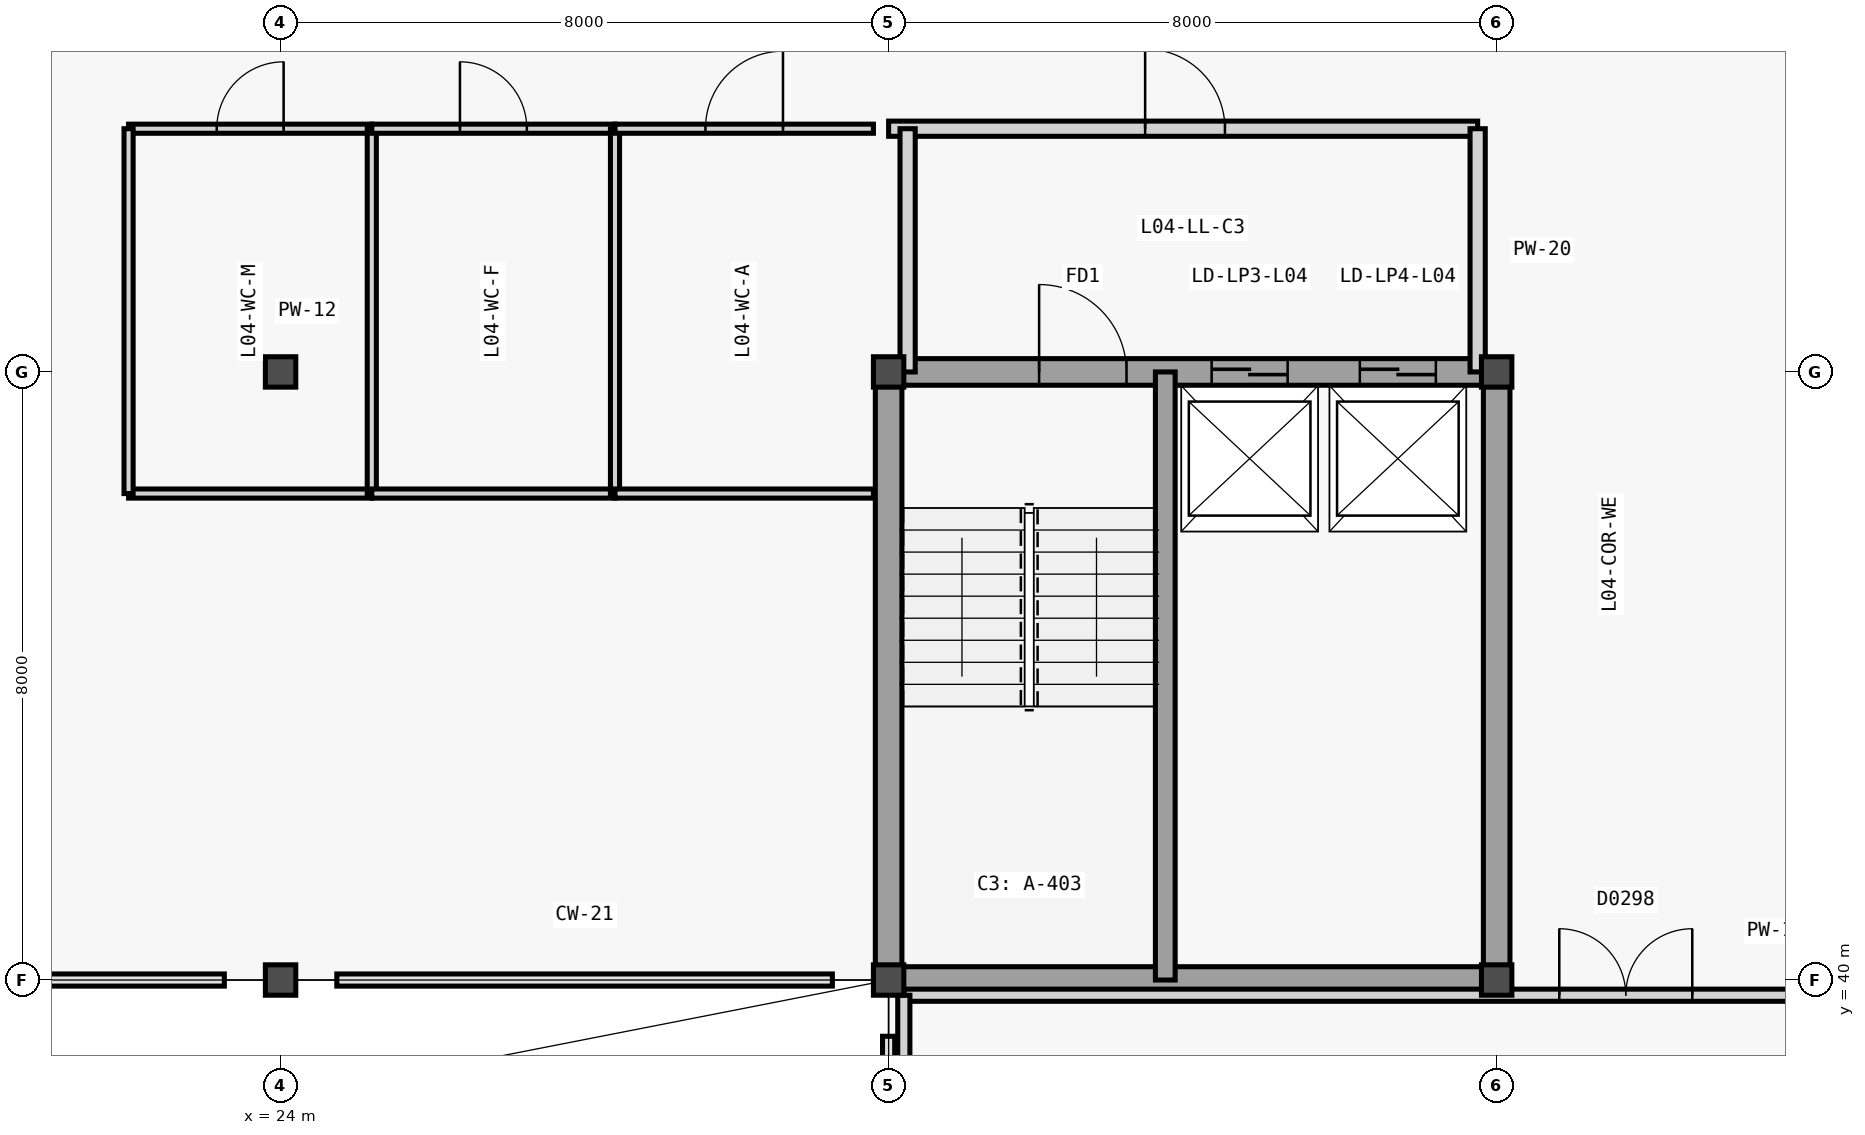
"""IFC4 building model, lengths in metres.
Left out: names, types, materials, properties, quantities, classifications, styles, units other than length and angle.
Written with IfcOpenShell. Run it as: python <this file> out.ifc"""

import sys

from ifc_helpers import new_model, si_unit, direction, frame, frame_2d, origin, origin_2d, place, context, subcontext, project, spatial, rectangle, extrude, element, fill, save


model = new_model("IFC4")
c1 = context("Model", 3, precision=1e-05, world=origin(), true_north=direction((0.0, 1.0)))
c2 = subcontext(c1, "Body", "Model", "MODEL_VIEW")
j1 = project(units=[si_unit("LENGTHUNIT", "METRE"), si_unit("PLANEANGLEUNIT", "RADIAN")], contexts=[c1])
p1 = place(None, origin())
s1 = spatial("IfcSite", under=j1, at=p1, CompositionType="ELEMENT")
p2 = place(p1, origin())
s2 = spatial("IfcBuilding", under=s1, at=p2, CompositionType="ELEMENT")
p3 = place(p2, frame((0.0, 0.0, 18.0)))
s3 = spatial("IfcBuildingStorey", under=s2, at=p3, CompositionType="ELEMENT", Elevation=18.0)
for number, where, z_axis, x_axis in (
    (1, (24.0, 40.0, 0.0), (0.0, 0.0, 1.0), (1.0, 0.0, 0.0)),
    (2, (24.0, 48.0, 0.0), (0.0, 0.0, 1.0), (1.0, 0.0, 0.0)),
    (3, (32.0, 40.0, 0.0), (0.0, 0.0, 1.0), (1.0, 0.0, 0.0)),
    (4, (32.0, 48.0, 0.0), (0.0, 0.0, 1.0), (1.0, 0.0, 0.0)),
    (5, (40.0, 40.0, 0.0), (0.0, 0.0, 1.0), (1.0, 0.0, 0.0)),
    (6, (40.0, 48.0, 0.0), (0.0, 0.0, 1.0), (1.0, 0.0, 0.0)),
):
    element("IfcColumn", number, at=place(p3, frame(where, z_axis=z_axis, x_axis=x_axis)), inside=s3, PredefinedType="COLUMN", context=c2, shape_type="SweptSolid", body=[
        extrude(rectangle(XDim=0.4, YDim=0.4, at=origin_2d()), origin(), (0.0, 0.0, 1.0), 3.6),
    ])
for number, where, z_axis, x_axis in (
    (7, (32.0, 40.0, 0.0), (0.0, 0.0, 1.0), (1.0, 0.0, 0.0)),
    (8, (32.0, 40.0, 0.0), (0.0, 0.0, 1.0), (0.0, 1.0, 0.0)),
    (9, (40.0, 40.0, 0.0), (0.0, 0.0, 1.0), (0.0, 1.0, 0.0)),
):
    element("IfcWall", number, at=place(p3, frame(where, z_axis=z_axis, x_axis=x_axis)), inside=s3, PredefinedType="SHEAR", context=c2, shape_type="SweptSolid", body=[
        extrude(rectangle(XDim=8.0, YDim=0.35, at=frame_2d((4.0, 0.0))), origin(), (0.0, 0.0, 1.0), 3.6),
    ])
p4 = place(p3, frame((32.0, 48.0, 0.0), z_axis=(0.0, 0.0, 1.0), x_axis=(1.0, 0.0, 0.0)))
e10 = element("IfcWall", 10, at=p4, inside=s3, PredefinedType="SHEAR", context=c2, shape_type="SweptSolid", body=[
    extrude(rectangle(XDim=8.0, YDim=0.35, at=frame_2d((4.0, 0.0))), origin(), (0.0, 0.0, 1.0), 3.6),
])
p5 = place(p4, frame((1.98, 0.0, 0.0)))
e11 = element("IfcOpeningElement", 11, at=p5, cuts=e10, PredefinedType="OPENING", context=c2, shape_type="SweptSolid", body=[
    extrude(rectangle(XDim=1.15, YDim=2.2, at=frame_2d((0.575, 1.1))), frame((0.0, 0.185, 0.0), z_axis=(0.0, -1.0, 0.0), x_axis=(1.0, 0.0, 0.0)), (0.0, 0.0, 1.0), 0.37),
])
p6 = place(p4, frame((4.25, 0.0, 0.0)))
e12 = element("IfcOpeningElement", 12, at=p6, cuts=e10, PredefinedType="OPENING", context=c2, shape_type="SweptSolid", body=[
    extrude(rectangle(XDim=1.0, YDim=2.15, at=frame_2d((0.5, 1.075))), frame((0.0, 0.185, 0.0), z_axis=(0.0, -1.0, 0.0), x_axis=(1.0, 0.0, 0.0)), (0.0, 0.0, 1.0), 0.37),
])
p7 = place(p4, frame((6.2, 0.0, 0.0)))
e13 = element("IfcOpeningElement", 13, at=p7, cuts=e10, PredefinedType="OPENING", context=c2, shape_type="SweptSolid", body=[
    extrude(rectangle(XDim=1.0, YDim=2.15, at=frame_2d((0.5, 1.075))), frame((0.0, 0.185, 0.0), z_axis=(0.0, -1.0, 0.0), x_axis=(1.0, 0.0, 0.0)), (0.0, 0.0, 1.0), 0.37),
])
p8 = place(p3, frame((35.64, 40.0, 0.0), z_axis=(0.0, 0.0, 1.0), x_axis=(0.0, 1.0, 0.0)))
e14 = element("IfcWall", 14, at=p8, inside=s3, PredefinedType="SHEAR", context=c2, shape_type="SweptSolid", body=[
    extrude(rectangle(XDim=8.0, YDim=0.26, at=frame_2d((4.0, 0.0))), origin(), (0.0, 0.0, 1.0), 3.6),
])
p9 = place(p3, frame((32.0, 51.2, 0.0), z_axis=(0.0, 0.0, 1.0), x_axis=(1.0, 0.0, 0.0)))
e15 = element("IfcWall", 15, at=p9, inside=s3, PredefinedType="PARTITIONING", context=c2, shape_type="SweptSolid", body=[
    extrude(rectangle(XDim=7.75, YDim=0.2, at=frame_2d((3.875, 0.0))), origin(), (0.0, 0.0, 1.0), 3.32),
])
p10 = place(p9, frame((3.375, 0.0, 0.0)))
e16 = element("IfcOpeningElement", 16, at=p10, cuts=e15, PredefinedType="OPENING", context=c2, shape_type="SweptSolid", body=[
    extrude(rectangle(XDim=1.05, YDim=2.15, at=frame_2d((0.525, 1.075))), frame((0.0, 0.11, 0.0), z_axis=(0.0, -1.0, 0.0), x_axis=(1.0, 0.0, 0.0)), (0.0, 0.0, 1.0), 0.22),
])
for number, where, z_axis, x_axis in (
    (17, (39.75, 48.0, 0.0), (0.0, 0.0, 1.0), (0.0, 1.0, 0.0)),
    (18, (32.25, 48.0, 0.0), (0.0, 0.0, 1.0), (0.0, 1.0, 0.0)),
):
    element("IfcWall", number, at=place(p3, frame(where, z_axis=z_axis, x_axis=x_axis)), inside=s3, PredefinedType="PARTITIONING", context=c2, shape_type="SweptSolid", body=[
        extrude(rectangle(XDim=3.2, YDim=0.2, at=frame_2d((1.6, 0.0))), origin(), (0.0, 0.0, 1.0), 2.78),
    ])
p11 = place(p3, frame((32.2, 39.8, 0.0), z_axis=(0.0, 0.0, 1.0), x_axis=(1.0, 0.0, 0.0)))
e19 = element("IfcWall", 19, at=p11, inside=s3, PredefinedType="PARTITIONING", context=c2, shape_type="SweptSolid", body=[
    extrude(rectangle(XDim=15.3, YDim=0.16, at=frame_2d((7.65, 0.0))), origin(), (0.0, 0.0, 1.0), 2.7),
])
p12 = place(p11, frame((8.624, 0.0, 0.0)))
e20 = element("IfcOpeningElement", 20, at=p12, cuts=e19, PredefinedType="OPENING", context=c2, shape_type="SweptSolid", body=[
    extrude(rectangle(XDim=1.75, YDim=2.2, at=frame_2d((0.875, 1.1))), frame((0.0, 0.09, 0.0), z_axis=(0.0, -1.0, 0.0), x_axis=(1.0, 0.0, 0.0)), (0.0, 0.0, 1.0), 0.18),
])
p13 = place(p3, frame((32.2, 16.5, 0.0), z_axis=(0.0, 0.0, 1.0), x_axis=(0.0, 1.0, 0.0)))
e21 = element("IfcWall", 21, at=p13, inside=s3, PredefinedType="PARTITIONING", context=c2, shape_type="SweptSolid", body=[
    extrude(rectangle(XDim=23.3, YDim=0.16, at=frame_2d((11.65, 0.0))), origin(), (0.0, 0.0, 1.0), 2.78),
])
p14 = place(p3, frame((22.0, 46.4, 0.0), z_axis=(0.0, 0.0, 1.0), x_axis=(1.0, 0.0, 0.0)))
e22 = element("IfcWall", 22, at=p14, inside=s3, PredefinedType="PARTITIONING", context=c2, shape_type="SweptSolid", body=[
    extrude(rectangle(XDim=3.2, YDim=0.12, at=frame_2d((1.6, 0.0))), origin(), (0.0, 0.0, 1.0), 3.34),
])
p15 = place(p3, frame((22.0, 51.2, 0.0), z_axis=(0.0, 0.0, 1.0), x_axis=(1.0, 0.0, 0.0)))
e23 = element("IfcWall", 23, at=p15, inside=s3, PredefinedType="PARTITIONING", context=c2, shape_type="SweptSolid", body=[
    extrude(rectangle(XDim=3.2, YDim=0.12, at=frame_2d((1.6, 0.0))), origin(), (0.0, 0.0, 1.0), 3.34),
])
p16 = place(p15, frame((1.16, 0.0, 0.0)))
e24 = element("IfcOpeningElement", 24, at=p16, cuts=e23, PredefinedType="OPENING", context=c2, shape_type="SweptSolid", body=[
    extrude(rectangle(XDim=0.88, YDim=2.1, at=frame_2d((0.44, 1.05))), frame((0.0, 0.07, 0.0), z_axis=(0.0, -1.0, 0.0), x_axis=(1.0, 0.0, 0.0)), (0.0, 0.0, 1.0), 0.14),
])
for number, where, z_axis, x_axis in (
    (25, (22.0, 46.4, 0.0), (0.0, 0.0, 1.0), (0.0, 1.0, 0.0)),
    (26, (25.2, 46.4, 0.0), (0.0, 0.0, 1.0), (0.0, 1.0, 0.0)),
):
    element("IfcWall", number, at=place(p3, frame(where, z_axis=z_axis, x_axis=x_axis)), inside=s3, PredefinedType="PARTITIONING", context=c2, shape_type="SweptSolid", body=[
        extrude(rectangle(XDim=4.8, YDim=0.12, at=frame_2d((2.4, 0.0))), origin(), (0.0, 0.0, 1.0), 3.34),
    ])
p17 = place(p3, frame((25.2, 46.4, 0.0), z_axis=(0.0, 0.0, 1.0), x_axis=(1.0, 0.0, 0.0)))
e27 = element("IfcWall", 27, at=p17, inside=s3, PredefinedType="PARTITIONING", context=c2, shape_type="SweptSolid", body=[
    extrude(rectangle(XDim=3.2, YDim=0.12, at=frame_2d((1.6, 0.0))), origin(), (0.0, 0.0, 1.0), 3.34),
])
p18 = place(p3, frame((25.2, 51.2, 0.0), z_axis=(0.0, 0.0, 1.0), x_axis=(1.0, 0.0, 0.0)))
e28 = element("IfcWall", 28, at=p18, inside=s3, PredefinedType="PARTITIONING", context=c2, shape_type="SweptSolid", body=[
    extrude(rectangle(XDim=3.2, YDim=0.12, at=frame_2d((1.6, 0.0))), origin(), (0.0, 0.0, 1.0), 3.34),
])
p19 = place(p18, frame((1.16, 0.0, 0.0)))
e29 = element("IfcOpeningElement", 29, at=p19, cuts=e28, PredefinedType="OPENING", context=c2, shape_type="SweptSolid", body=[
    extrude(rectangle(XDim=0.88, YDim=2.1, at=frame_2d((0.44, 1.05))), frame((0.0, 0.07, 0.0), z_axis=(0.0, -1.0, 0.0), x_axis=(1.0, 0.0, 0.0)), (0.0, 0.0, 1.0), 0.14),
])
p20 = place(p3, frame((28.4, 46.4, 0.0), z_axis=(0.0, 0.0, 1.0), x_axis=(0.0, 1.0, 0.0)))
e30 = element("IfcWall", 30, at=p20, inside=s3, PredefinedType="PARTITIONING", context=c2, shape_type="SweptSolid", body=[
    extrude(rectangle(XDim=4.8, YDim=0.12, at=frame_2d((2.4, 0.0))), origin(), (0.0, 0.0, 1.0), 3.34),
])
p21 = place(p3, frame((28.4, 46.4, 0.0), z_axis=(0.0, 0.0, 1.0), x_axis=(1.0, 0.0, 0.0)))
e31 = element("IfcWall", 31, at=p21, inside=s3, PredefinedType="PARTITIONING", context=c2, shape_type="SweptSolid", body=[
    extrude(rectangle(XDim=3.4, YDim=0.12, at=frame_2d((1.7, 0.0))), origin(), (0.0, 0.0, 1.0), 3.34),
])
p22 = place(p3, frame((28.4, 51.2, 0.0), z_axis=(0.0, 0.0, 1.0), x_axis=(1.0, 0.0, 0.0)))
e32 = element("IfcWall", 32, at=p22, inside=s3, PredefinedType="PARTITIONING", context=c2, shape_type="SweptSolid", body=[
    extrude(rectangle(XDim=3.4, YDim=0.12, at=frame_2d((1.7, 0.0))), origin(), (0.0, 0.0, 1.0), 3.34),
])
p23 = place(p22, frame((1.19, 0.0, 0.0)))
e33 = element("IfcOpeningElement", 33, at=p23, cuts=e32, PredefinedType="OPENING", context=c2, shape_type="SweptSolid", body=[
    extrude(rectangle(XDim=1.02, YDim=2.1, at=frame_2d((0.51, 1.05))), frame((0.0, 0.07, 0.0), z_axis=(0.0, -1.0, 0.0), x_axis=(1.0, 0.0, 0.0)), (0.0, 0.0, 1.0), 0.14),
])
p24 = place(p5, origin())
e34 = element("IfcDoor", 34, at=p24, inside=s3, OperationType="SINGLE_SWING_LEFT", PredefinedType="DOOR", context=c2, shape_type="SweptSolid", body=[
    extrude(rectangle(XDim=1.15, YDim=2.2, at=frame_2d((0.575, 1.1))), frame((0.0, 0.025, 0.0), z_axis=(0.0, -1.0, 0.0), x_axis=(1.0, 0.0, 0.0)), (0.0, 0.0, 1.0), 0.05),
])
fill(e11, e34)
p25 = place(p6, origin())
e35 = element("IfcDoor", 35, at=p25, inside=s3, OperationType="DOUBLE_DOOR_SLIDING", PredefinedType="DOOR", context=c2, shape_type="SweptSolid", body=[
    extrude(rectangle(XDim=1.0, YDim=2.15, at=frame_2d((0.5, 1.075))), frame((0.0, 0.025, 0.0), z_axis=(0.0, -1.0, 0.0), x_axis=(1.0, 0.0, 0.0)), (0.0, 0.0, 1.0), 0.05),
])
fill(e12, e35)
p26 = place(p7, origin())
e36 = element("IfcDoor", 36, at=p26, inside=s3, OperationType="DOUBLE_DOOR_SLIDING", PredefinedType="DOOR", context=c2, shape_type="SweptSolid", body=[
    extrude(rectangle(XDim=1.0, YDim=2.15, at=frame_2d((0.5, 1.075))), frame((0.0, 0.025, 0.0), z_axis=(0.0, -1.0, 0.0), x_axis=(1.0, 0.0, 0.0)), (0.0, 0.0, 1.0), 0.05),
])
fill(e13, e36)
p27 = place(p10, origin())
e37 = element("IfcDoor", 37, at=p27, inside=s3, OperationType="SINGLE_SWING_LEFT", PredefinedType="DOOR", context=c2, shape_type="SweptSolid", body=[
    extrude(rectangle(XDim=1.05, YDim=2.15, at=frame_2d((0.525, 1.075))), frame((0.0, 0.025, 0.0), z_axis=(0.0, -1.0, 0.0), x_axis=(1.0, 0.0, 0.0)), (0.0, 0.0, 1.0), 0.05),
])
fill(e16, e37)
p28 = place(p12, origin())
e38 = element("IfcDoor", 38, at=p28, inside=s3, OperationType="DOUBLE_DOOR_SINGLE_SWING", PredefinedType="DOOR", context=c2, shape_type="SweptSolid", body=[
    extrude(rectangle(XDim=1.75, YDim=2.2, at=frame_2d((0.875, 1.1))), frame((0.0, 0.025, 0.0), z_axis=(0.0, -1.0, 0.0), x_axis=(1.0, 0.0, 0.0)), (0.0, 0.0, 1.0), 0.05),
])
fill(e20, e38)
p29 = place(p16, origin())
e39 = element("IfcDoor", 39, at=p29, inside=s3, OperationType="SINGLE_SWING_RIGHT", PredefinedType="DOOR", context=c2, shape_type="SweptSolid", body=[
    extrude(rectangle(XDim=0.88, YDim=2.1, at=frame_2d((0.44, 1.05))), frame((0.0, 0.025, 0.0), z_axis=(0.0, -1.0, 0.0), x_axis=(1.0, 0.0, 0.0)), (0.0, 0.0, 1.0), 0.05),
])
fill(e24, e39)
p30 = place(p19, origin())
e40 = element("IfcDoor", 40, at=p30, inside=s3, OperationType="SINGLE_SWING_LEFT", PredefinedType="DOOR", context=c2, shape_type="SweptSolid", body=[
    extrude(rectangle(XDim=0.88, YDim=2.1, at=frame_2d((0.44, 1.05))), frame((0.0, 0.025, 0.0), z_axis=(0.0, -1.0, 0.0), x_axis=(1.0, 0.0, 0.0)), (0.0, 0.0, 1.0), 0.05),
])
fill(e29, e40)
p31 = place(p23, origin())
e41 = element("IfcDoor", 41, at=p31, inside=s3, OperationType="SINGLE_SWING_RIGHT", PredefinedType="DOOR", context=c2, shape_type="SweptSolid", body=[
    extrude(rectangle(XDim=1.02, YDim=2.1, at=frame_2d((0.51, 1.05))), frame((0.0, 0.025, 0.0), z_axis=(0.0, -1.0, 0.0), x_axis=(1.0, 0.0, 0.0)), (0.0, 0.0, 1.0), 0.05),
])
fill(e33, e41)
save(model, sys.argv[1])
